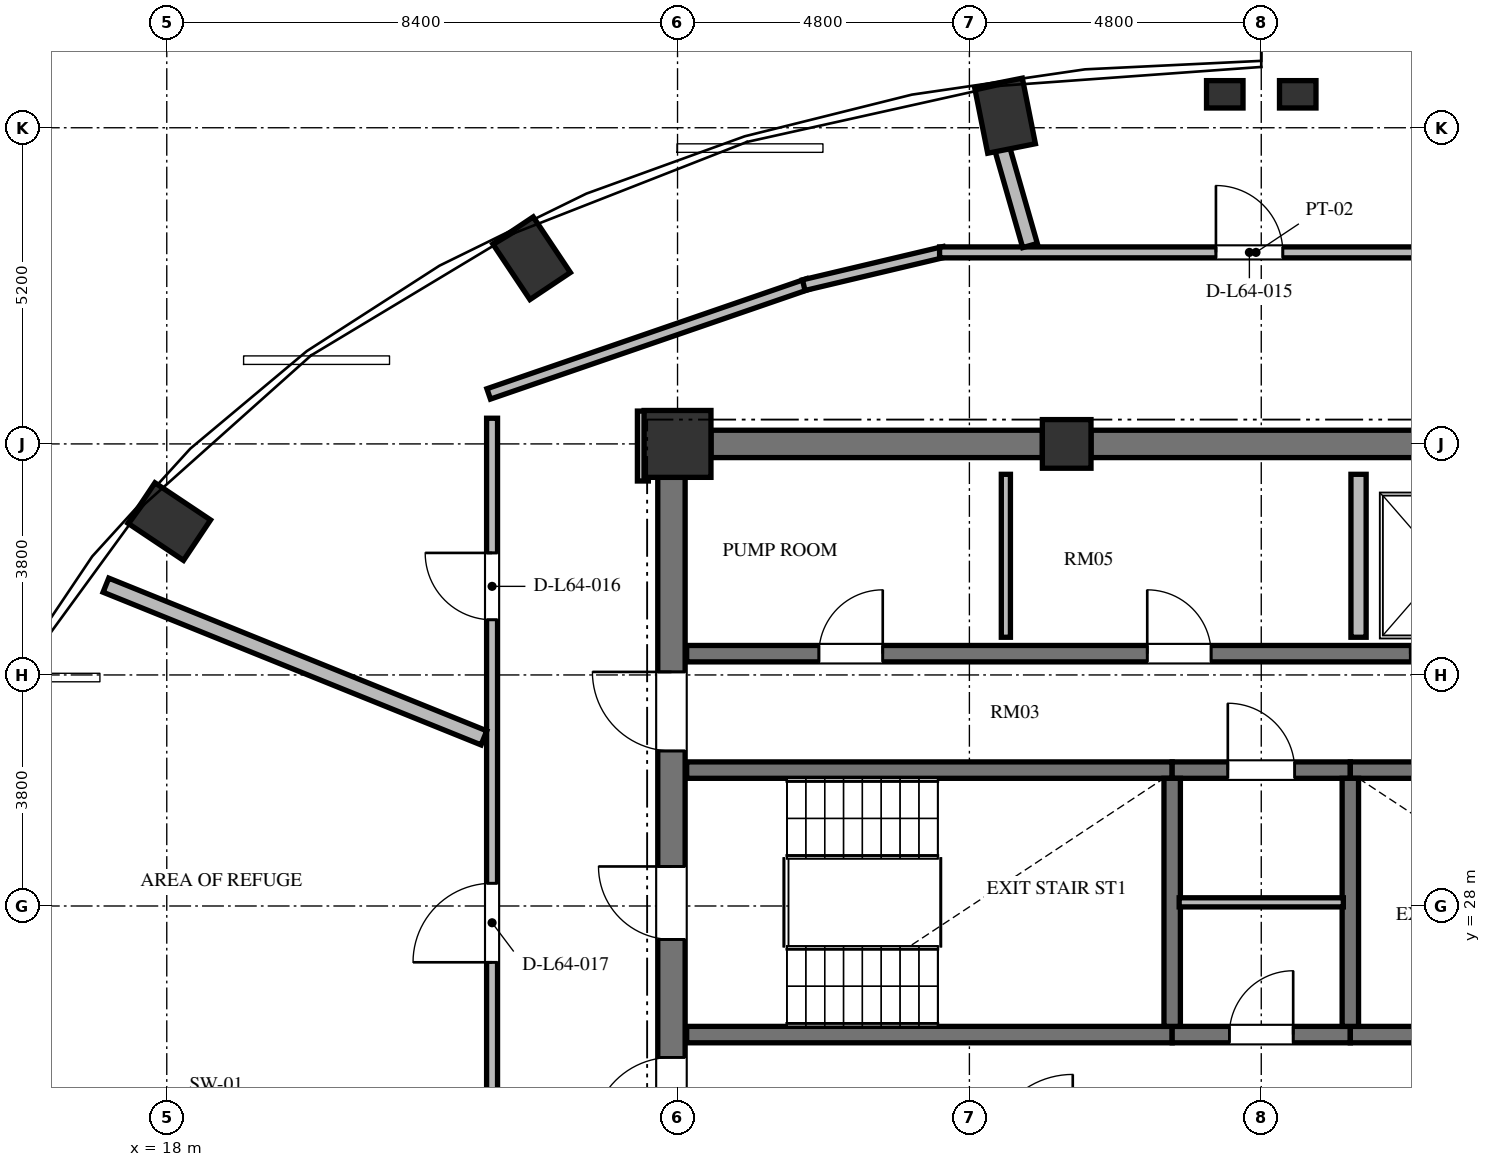
"""IFC4 building model, lengths in metres.
Left out: names, types, materials, properties, quantities, classifications, styles, units other than length and angle.
Written with IfcOpenShell. Run it as: python <this file> out.ifc"""

import sys

from ifc_helpers import new_model, si_unit, direction, frame, frame_2d, origin, origin_2d, place, context, subcontext, project, spatial, rectangle, extrude, element, fill, save


model = new_model("IFC4")
c1 = context("Model", 3, precision=1e-05, world=origin(), true_north=direction((0.0, 1.0)))
c2 = subcontext(c1, "Body", "Model", "MODEL_VIEW")
j1 = project(units=[si_unit("LENGTHUNIT", "METRE"), si_unit("PLANEANGLEUNIT", "RADIAN")], contexts=[c1])
p1 = place(None, origin())
s1 = spatial("IfcSite", under=j1, at=p1, CompositionType="ELEMENT")
p2 = place(p1, origin())
s2 = spatial("IfcBuilding", under=s1, at=p2, CompositionType="ELEMENT")
p3 = place(p2, frame((0.0, 0.0, 245.904)))
s3 = spatial("IfcBuildingStorey", under=s2, at=p3, CompositionType="ELEMENT", Elevation=245.904)
for number, where, z_axis, x_axis in (
    (1, (31.786, 40.998, 0.0), (0.0, 0.0, 1.0), (-0.195, 0.981, 0.0)),
    (2, (24.0, 38.654, 0.0), (0.0, 0.0, 1.0), (-0.556, 0.831, 0.0)),
    (3, (18.04, 34.323, 0.0), (0.0, 0.0, 1.0), (-0.831, 0.556, 0.0)),
):
    element("IfcColumn", number, at=place(p3, frame(where, z_axis=z_axis, x_axis=x_axis)), inside=s3, PredefinedType="COLUMN", context=c2, shape_type="SweptSolid", body=[
        extrude(rectangle(XDim=1.1, YDim=0.8, at=origin_2d()), origin(), (0.0, 0.0, 1.0), 5.472),
    ])
p4 = place(p3, frame((32.8, 35.6, 0.0), z_axis=(0.0, 0.0, 1.0), x_axis=(1.0, 0.0, 0.0)))
e4 = element("IfcColumn", 4, at=p4, inside=s3, PredefinedType="COLUMN", context=c2, shape_type="SweptSolid", body=[
    extrude(rectangle(XDim=0.8, YDim=0.8, at=origin_2d()), origin(), (0.0, 0.0, 1.0), 5.472),
])
p5 = place(p3, frame((26.4, 35.6, 0.0), z_axis=(0.0, 0.0, 1.0), x_axis=(1.0, 0.0, 0.0)))
e5 = element("IfcColumn", 5, at=p5, inside=s3, PredefinedType="COLUMN", context=c2, shape_type="SweptSolid", body=[
    extrude(rectangle(XDim=1.1, YDim=1.1, at=origin_2d()), origin(), (0.0, 0.0, 1.0), 5.472),
])
for number, where, z_axis, x_axis in (
    (6, (35.4, 41.35, 0.0), (0.0, 0.0, 1.0), (1.0, 0.0, 0.0)),
    (7, (36.6, 41.35, 0.0), (0.0, 0.0, 1.0), (1.0, 0.0, 0.0)),
):
    element("IfcColumn", number, at=place(p3, frame(where, z_axis=z_axis, x_axis=x_axis)), inside=s3, PredefinedType="PILASTER", context=c2, shape_type="SweptSolid", body=[
        extrude(rectangle(XDim=0.6, YDim=0.45, at=origin_2d()), origin(), (0.0, 0.0, 1.0), 5.472),
    ])
p6 = place(p3, frame((26.3, 20.95, 0.0), z_axis=(0.0, 0.0, 1.0), x_axis=(0.0, 1.0, 0.0)))
e8 = element("IfcWall", 8, at=p6, inside=s3, PredefinedType="SHEAR", context=c2, shape_type="SweptSolid", body=[
    extrude(rectangle(XDim=14.1, YDim=0.45, at=frame_2d((7.05, 0.0))), origin(), (0.0, 0.0, 1.0), 5.472),
])
p7 = place(p6, frame((6.5, 0.0, 0.0)))
e9 = element("IfcOpeningElement", 9, at=p7, cuts=e8, PredefinedType="OPENING", context=c2, shape_type="SweptSolid", body=[
    extrude(rectangle(XDim=1.2, YDim=2.15, at=frame_2d((0.6, 1.075))), frame((0.0, 0.235, 0.0), z_axis=(0.0, -1.0, 0.0), x_axis=(1.0, 0.0, 0.0)), (0.0, 0.0, 1.0), 0.47),
])
p8 = place(p6, frame((9.6, 0.0, 0.0)))
e10 = element("IfcOpeningElement", 10, at=p8, cuts=e8, PredefinedType="OPENING", context=c2, shape_type="SweptSolid", body=[
    extrude(rectangle(XDim=1.3, YDim=2.2, at=frame_2d((0.65, 1.1))), frame((0.0, 0.235, 0.0), z_axis=(0.0, -1.0, 0.0), x_axis=(1.0, 0.0, 0.0)), (0.0, 0.0, 1.0), 0.47),
])
p9 = place(p6, frame((3.26, 0.0, 0.0)))
e11 = element("IfcOpeningElement", 11, at=p9, cuts=e8, PredefinedType="OPENING", context=c2, shape_type="SweptSolid", body=[
    extrude(rectangle(XDim=1.3, YDim=2.2, at=frame_2d((0.65, 1.1))), frame((0.0, 0.235, 0.0), z_axis=(0.0, -1.0, 0.0), x_axis=(1.0, 0.0, 0.0)), (0.0, 0.0, 1.0), 0.47),
])
p10 = place(p3, frame((26.95, 35.6, 0.0), z_axis=(0.0, 0.0, 1.0), x_axis=(1.0, 0.0, 0.0)))
e12 = element("IfcWall", 12, at=p10, inside=s3, PredefinedType="SHEAR", context=c2, shape_type="SweptSolid", body=[
    extrude(rectangle(XDim=5.45, YDim=0.45, at=frame_2d((2.725, 0.0))), origin(), (0.0, 0.0, 1.0), 5.472),
])
p11 = place(p3, frame((33.2, 35.6, 0.0), z_axis=(0.0, 0.0, 1.0), x_axis=(1.0, 0.0, 0.0)))
e13 = element("IfcWall", 13, at=p11, inside=s3, PredefinedType="SHEAR", context=c2, shape_type="SweptSolid", body=[
    extrude(rectangle(XDim=5.6, YDim=0.45, at=frame_2d((2.8, 0.0))), origin(), (0.0, 0.0, 1.0), 5.472),
])
p12 = place(p3, frame((26.55, 30.235, 0.0), z_axis=(0.0, 0.0, 1.0), x_axis=(1.0, 0.0, 0.0)))
e14 = element("IfcWall", 14, at=p12, inside=s3, PredefinedType="SHEAR", context=c2, shape_type="SweptSolid", body=[
    extrude(rectangle(XDim=7.985, YDim=0.27, at=frame_2d((3.992, 0.0))), origin(), (0.0, 0.0, 1.0), 5.472),
])
p13 = place(p3, frame((34.535, 30.235, 0.0), z_axis=(0.0, 0.0, 1.0), x_axis=(1.0, 0.0, 0.0)))
e15 = element("IfcWall", 15, at=p13, inside=s3, PredefinedType="SHEAR", context=c2, shape_type="SweptSolid", body=[
    extrude(rectangle(XDim=2.93, YDim=0.27, at=frame_2d((1.465, 0.0))), origin(), (0.0, 0.0, 1.0), 5.472),
])
p14 = place(p13, frame((0.915, 0.0, 0.0)))
e16 = element("IfcOpeningElement", 16, at=p14, cuts=e15, PredefinedType="OPENING", context=c2, shape_type="SweptSolid", body=[
    extrude(rectangle(XDim=1.1, YDim=2.15, at=frame_2d((0.55, 1.075))), frame((0.0, 0.145, 0.0), z_axis=(0.0, -1.0, 0.0), x_axis=(1.0, 0.0, 0.0)), (0.0, 0.0, 1.0), 0.29),
])
p15 = place(p3, frame((37.465, 30.235, 0.0), z_axis=(0.0, 0.0, 1.0), x_axis=(1.0, 0.0, 0.0)))
e17 = element("IfcWall", 17, at=p15, inside=s3, PredefinedType="SHEAR", context=c2, shape_type="SweptSolid", body=[
    extrude(rectangle(XDim=7.985, YDim=0.27, at=frame_2d((3.992, 0.0))), origin(), (0.0, 0.0, 1.0), 5.472),
])
p16 = place(p15, frame((6.455, 0.0, 0.0)))
e18 = element("IfcOpeningElement", 18, at=p16, cuts=e17, PredefinedType="OPENING", context=c2, shape_type="SweptSolid", body=[
    extrude(rectangle(XDim=1.2, YDim=2.15, at=frame_2d((0.6, 1.075))), frame((0.0, 0.145, 0.0), z_axis=(0.0, -1.0, 0.0), x_axis=(1.0, 0.0, 0.0)), (0.0, 0.0, 1.0), 0.29),
])
p17 = place(p3, frame((26.55, 25.885, 0.0), z_axis=(0.0, 0.0, 1.0), x_axis=(1.0, 0.0, 0.0)))
e19 = element("IfcWall", 19, at=p17, inside=s3, PredefinedType="SHEAR", context=c2, shape_type="SweptSolid", body=[
    extrude(rectangle(XDim=7.985, YDim=0.27, at=frame_2d((3.992, 0.0))), origin(), (0.0, 0.0, 1.0), 5.472),
])
p18 = place(p3, frame((34.535, 25.885, 0.0), z_axis=(0.0, 0.0, 1.0), x_axis=(1.0, 0.0, 0.0)))
e20 = element("IfcWall", 20, at=p18, inside=s3, PredefinedType="SHEAR", context=c2, shape_type="SweptSolid", body=[
    extrude(rectangle(XDim=2.93, YDim=0.27, at=frame_2d((1.465, 0.0))), origin(), (0.0, 0.0, 1.0), 5.472),
])
p19 = place(p18, frame((0.94, 0.0, 0.0)))
e21 = element("IfcOpeningElement", 21, at=p19, cuts=e20, PredefinedType="OPENING", context=c2, shape_type="SweptSolid", body=[
    extrude(rectangle(XDim=1.05, YDim=2.15, at=frame_2d((0.525, 1.075))), frame((0.0, 0.145, 0.0), z_axis=(0.0, -1.0, 0.0), x_axis=(1.0, 0.0, 0.0)), (0.0, 0.0, 1.0), 0.29),
])
p20 = place(p3, frame((37.465, 25.885, 0.0), z_axis=(0.0, 0.0, 1.0), x_axis=(1.0, 0.0, 0.0)))
e22 = element("IfcWall", 22, at=p20, inside=s3, PredefinedType="SHEAR", context=c2, shape_type="SweptSolid", body=[
    extrude(rectangle(XDim=7.985, YDim=0.27, at=frame_2d((3.992, 0.0))), origin(), (0.0, 0.0, 1.0), 5.472),
])
for number, where, z_axis, x_axis in (
    (23, (34.535, 26.02, 0.0), (0.0, 0.0, 1.0), (0.0, 1.0, 0.0)),
    (24, (37.465, 26.02, 0.0), (0.0, 0.0, 1.0), (0.0, 1.0, 0.0)),
):
    element("IfcWall", number, at=place(p3, frame(where, z_axis=z_axis, x_axis=x_axis)), inside=s3, PredefinedType="SHEAR", context=c2, shape_type="SweptSolid", body=[
        extrude(rectangle(XDim=4.08, YDim=0.27, at=frame_2d((2.04, 0.0))), origin(), (0.0, 0.0, 1.0), 5.472),
    ])
p21 = place(p3, frame((34.65, 28.06, 0.0), z_axis=(0.0, 0.0, 1.0), x_axis=(1.0, 0.0, 0.0)))
e25 = element("IfcWall", 25, at=p21, inside=s3, PredefinedType="PARTITIONING", context=c2, shape_type="SweptSolid", body=[
    extrude(rectangle(XDim=2.7, YDim=0.15, at=frame_2d((1.35, 0.0))), origin(), (0.0, 0.0, 1.0), 5.272),
])
p22 = place(p3, frame((26.55, 32.15, 0.0), z_axis=(0.0, 0.0, 1.0), x_axis=(1.0, 0.0, 0.0)))
e26 = element("IfcWall", 26, at=p22, inside=s3, PredefinedType="SHEAR", context=c2, shape_type="SweptSolid", body=[
    extrude(rectangle(XDim=16.4, YDim=0.27, at=frame_2d((8.2, 0.0))), origin(), (0.0, 0.0, 1.0), 5.472),
])
p23 = place(p22, frame((2.175, 0.0, 0.0)))
e27 = element("IfcOpeningElement", 27, at=p23, cuts=e26, PredefinedType="OPENING", context=c2, shape_type="SweptSolid", body=[
    extrude(rectangle(XDim=1.05, YDim=2.15, at=frame_2d((0.525, 1.075))), frame((0.0, 0.145, 0.0), z_axis=(0.0, -1.0, 0.0), x_axis=(1.0, 0.0, 0.0)), (0.0, 0.0, 1.0), 0.29),
])
p24 = place(p22, frame((7.575, 0.0, 0.0)))
e28 = element("IfcOpeningElement", 28, at=p24, cuts=e26, PredefinedType="OPENING", context=c2, shape_type="SweptSolid", body=[
    extrude(rectangle(XDim=1.05, YDim=2.15, at=frame_2d((0.525, 1.075))), frame((0.0, 0.145, 0.0), z_axis=(0.0, -1.0, 0.0), x_axis=(1.0, 0.0, 0.0)), (0.0, 0.0, 1.0), 0.29),
])
p25 = place(p22, frame((11.9, 0.0, 0.0)))
e29 = element("IfcOpeningElement", 29, at=p25, cuts=e26, PredefinedType="OPENING", context=c2, shape_type="SweptSolid", body=[
    extrude(rectangle(XDim=1.1, YDim=2.2, at=frame_2d((0.55, 1.1))), frame((0.0, 0.145, 0.0), z_axis=(0.0, -1.0, 0.0), x_axis=(1.0, 0.0, 0.0)), (0.0, 0.0, 1.0), 0.29),
])
p26 = place(p22, frame((14.5, 0.0, 0.0)))
e30 = element("IfcOpeningElement", 30, at=p26, cuts=e26, PredefinedType="OPENING", context=c2, shape_type="SweptSolid", body=[
    extrude(rectangle(XDim=1.1, YDim=2.2, at=frame_2d((0.55, 1.1))), frame((0.0, 0.145, 0.0), z_axis=(0.0, -1.0, 0.0), x_axis=(1.0, 0.0, 0.0)), (0.0, 0.0, 1.0), 0.29),
])
p27 = place(p3, frame((37.6, 32.42, 0.0), z_axis=(0.0, 0.0, 1.0), x_axis=(0.0, 1.0, 0.0)))
e31 = element("IfcWall", 31, at=p27, inside=s3, PredefinedType="SOLIDWALL", context=c2, shape_type="SweptSolid", body=[
    extrude(rectangle(XDim=2.68, YDim=0.25, at=frame_2d((1.34, 0.0))), origin(), (0.0, 0.0, 1.0), 5.272),
])
p28 = place(p3, frame((31.8, 32.42, 0.0), z_axis=(0.0, 0.0, 1.0), x_axis=(0.0, 1.0, 0.0)))
e32 = element("IfcWall", 32, at=p28, inside=s3, PredefinedType="PARTITIONING", context=c2, shape_type="SweptSolid", body=[
    extrude(rectangle(XDim=2.68, YDim=0.15, at=frame_2d((1.34, 0.0))), origin(), (0.0, 0.0, 1.0), 5.272),
])
p29 = place(p3, frame((23.294, 36.422, 0.0), z_axis=(0.0, 0.0, 1.0), x_axis=(0.945493277461, 0.325641616316, 0.0)))
e33 = element("IfcWall", 33, at=p29, inside=s3, PredefinedType="PARTITIONING", context=c2, shape_type="SweptSolid", body=[
    extrude(rectangle(XDim=5.562, YDim=0.18, at=frame_2d((2.781, 0.0))), origin(), (0.0, 0.0, 1.0), 4.897),
])
p30 = place(p3, frame((28.476, 38.211, 0.0), z_axis=(0.0, 0.0, 1.0), x_axis=(0.973030562203, 0.230676234189, 0.0)))
e34 = element("IfcWall", 34, at=p30, inside=s3, PredefinedType="PARTITIONING", context=c2, shape_type="SweptSolid", body=[
    extrude(rectangle(XDim=2.377, YDim=0.18, at=frame_2d((1.188, 0.0))), origin(), (0.0, 0.0, 1.0), 5.272),
])
p31 = place(p3, frame((30.71, 38.75, 0.0), z_axis=(0.0, 0.0, 1.0), x_axis=(1.0, 0.0, 0.0)))
e35 = element("IfcWall", 35, at=p31, inside=s3, PredefinedType="PARTITIONING", context=c2, shape_type="SweptSolid", body=[
    extrude(rectangle(XDim=20.815, YDim=0.18, at=frame_2d((10.408, 0.0))), origin(), (0.0, 0.0, 1.0), 4.897),
])
p32 = place(p31, frame((16.846, 0.0, 0.0)))
e36 = element("IfcOpeningElement", 36, at=p32, cuts=e35, PredefinedType="OPENING", context=c2, shape_type="SweptSolid", body=[
    extrude(rectangle(XDim=0.95, YDim=2.1, at=frame_2d((0.475, 1.05))), frame((0.0, 0.1, 0.0), z_axis=(0.0, -1.0, 0.0), x_axis=(1.0, 0.0, 0.0)), (0.0, 0.0, 1.0), 0.2),
])
p33 = place(p31, frame((10.715, 0.0, 0.0)))
e37 = element("IfcOpeningElement", 37, at=p33, cuts=e35, PredefinedType="OPENING", context=c2, shape_type="SweptSolid", body=[
    extrude(rectangle(XDim=1.3, YDim=2.2, at=frame_2d((0.65, 1.1))), frame((0.0, 0.1, 0.0), z_axis=(0.0, -1.0, 0.0), x_axis=(1.0, 0.0, 0.0)), (0.0, 0.0, 1.0), 0.2),
])
p34 = place(p31, frame((4.545, 0.0, 0.0)))
e38 = element("IfcOpeningElement", 38, at=p34, cuts=e35, PredefinedType="OPENING", context=c2, shape_type="SweptSolid", body=[
    extrude(rectangle(XDim=1.1, YDim=2.15, at=frame_2d((0.55, 1.075))), frame((0.0, 0.1, 0.0), z_axis=(0.0, -1.0, 0.0), x_axis=(1.0, 0.0, 0.0)), (0.0, 0.0, 1.0), 0.2),
])
p35 = place(p3, frame((25.83, 36.14, 0.0), z_axis=(0.0, 0.0, 1.0), x_axis=(0.0, -1.0, 0.0)))
e39 = element("IfcWall", 39, at=p35, inside=s3, PredefinedType="PARTITIONING", context=c2, shape_type="SweptSolid", body=[
    extrude(rectangle(XDim=1.15, YDim=0.18, at=frame_2d((0.575, 0.0))), origin(), (0.0, 0.0, 1.0), 5.272),
])
p36 = place(p3, frame((23.35, 19.98, 0.0), z_axis=(0.0, 0.0, 1.0), x_axis=(0.0, 1.0, 0.0)))
e40 = element("IfcWall", 40, at=p36, inside=s3, PredefinedType="PARTITIONING", context=c2, shape_type="SweptSolid", body=[
    extrude(rectangle(XDim=16.042, YDim=0.18, at=frame_2d((8.021, 0.0))), origin(), (0.0, 0.0, 1.0), 5.272),
])
p37 = place(p36, frame((1.848, 0.0, 0.0)))
e41 = element("IfcOpeningElement", 41, at=p37, cuts=e40, PredefinedType="OPENING", context=c2, shape_type="SweptSolid", body=[
    extrude(rectangle(XDim=1.3, YDim=2.2, at=frame_2d((0.65, 1.1))), frame((0.0, 0.1, 0.0), z_axis=(0.0, -1.0, 0.0), x_axis=(1.0, 0.0, 0.0)), (0.0, 0.0, 1.0), 0.2),
])
p38 = place(p36, frame((12.727, 0.0, 0.0)))
e42 = element("IfcOpeningElement", 42, at=p38, cuts=e40, PredefinedType="OPENING", context=c2, shape_type="SweptSolid", body=[
    extrude(rectangle(XDim=1.1, YDim=2.15, at=frame_2d((0.55, 1.075))), frame((0.0, 0.1, 0.0), z_axis=(0.0, -1.0, 0.0), x_axis=(1.0, 0.0, 0.0)), (0.0, 0.0, 1.0), 0.2),
])
p39 = place(p36, frame((7.094, 0.0, 0.0)))
e43 = element("IfcOpeningElement", 43, at=p39, cuts=e40, PredefinedType="OPENING", context=c2, shape_type="SweptSolid", body=[
    extrude(rectangle(XDim=1.3, YDim=2.2, at=frame_2d((0.65, 1.1))), frame((0.0, 0.1, 0.0), z_axis=(0.0, -1.0, 0.0), x_axis=(1.0, 0.0, 0.0)), (0.0, 0.0, 1.0), 0.2),
])
p40 = place(p3, frame((32.197, 38.863, 0.0), z_axis=(0.0, 0.0, 1.0), x_axis=(-0.2757058954, 0.961242039885, 0.0)))
e44 = element("IfcWall", 44, at=p40, inside=s3, PredefinedType="SOLIDWALL", context=c2, shape_type="SweptSolid", body=[
    extrude(rectangle(XDim=2.324, YDim=0.25, at=frame_2d((1.162, 0.0))), origin(), (0.0, 0.0, 1.0), 4.757),
])
p41 = place(p3, frame((23.216, 30.765, 0.0), z_axis=(0.0, 0.0, 1.0), x_axis=(-0.927177883422, 0.374621372179, 0.0)))
e45 = element("IfcWall", 45, at=p41, inside=s3, PredefinedType="SOLIDWALL", context=c2, shape_type="SweptSolid", body=[
    extrude(rectangle(XDim=6.705, YDim=0.25, at=frame_2d((3.353, 0.0))), origin(), (0.0, 0.0, 1.0), 5.272),
])
p42 = place(p7, origin())
e46 = element("IfcDoor", 46, at=p42, inside=s3, OperationType="SINGLE_SWING_RIGHT", PredefinedType="DOOR", context=c2, shape_type="SweptSolid", body=[
    extrude(rectangle(XDim=1.2, YDim=2.15, at=frame_2d((0.6, 1.075))), frame((0.0, 0.025, 0.0), z_axis=(0.0, -1.0, 0.0), x_axis=(1.0, 0.0, 0.0)), (0.0, 0.0, 1.0), 0.05),
])
fill(e9, e46)
p43 = place(p19, origin())
e47 = element("IfcDoor", 47, at=p43, inside=s3, OperationType="SINGLE_SWING_RIGHT", PredefinedType="DOOR", context=c2, shape_type="SweptSolid", body=[
    extrude(rectangle(XDim=1.05, YDim=2.15, at=frame_2d((0.525, 1.075))), frame((0.0, 0.025, 0.0), z_axis=(0.0, -1.0, 0.0), x_axis=(1.0, 0.0, 0.0)), (0.0, 0.0, 1.0), 0.05),
])
fill(e21, e47)
p44 = place(p14, origin())
e48 = element("IfcDoor", 48, at=p44, inside=s3, OperationType="SINGLE_SWING_LEFT", PredefinedType="DOOR", context=c2, shape_type="SweptSolid", body=[
    extrude(rectangle(XDim=1.1, YDim=2.15, at=frame_2d((0.55, 1.075))), frame((0.0, 0.025, 0.0), z_axis=(0.0, -1.0, 0.0), x_axis=(1.0, 0.0, 0.0)), (0.0, 0.0, 1.0), 0.05),
])
fill(e16, e48)
p45 = place(p8, origin())
e49 = element("IfcDoor", 49, at=p45, inside=s3, OperationType="SINGLE_SWING_RIGHT", PredefinedType="DOOR", context=c2, shape_type="SweptSolid", body=[
    extrude(rectangle(XDim=1.3, YDim=2.2, at=frame_2d((0.65, 1.1))), frame((0.0, 0.025, 0.0), z_axis=(0.0, -1.0, 0.0), x_axis=(1.0, 0.0, 0.0)), (0.0, 0.0, 1.0), 0.05),
])
fill(e10, e49)
p46 = place(p9, origin())
e50 = element("IfcDoor", 50, at=p46, inside=s3, OperationType="SINGLE_SWING_LEFT", PredefinedType="DOOR", context=c2, shape_type="SweptSolid", body=[
    extrude(rectangle(XDim=1.3, YDim=2.2, at=frame_2d((0.65, 1.1))), frame((0.0, 0.025, 0.0), z_axis=(0.0, -1.0, 0.0), x_axis=(1.0, 0.0, 0.0)), (0.0, 0.0, 1.0), 0.05),
])
fill(e11, e50)
p47 = place(p23, origin())
e51 = element("IfcDoor", 51, at=p47, inside=s3, OperationType="SINGLE_SWING_RIGHT", PredefinedType="DOOR", context=c2, shape_type="SweptSolid", body=[
    extrude(rectangle(XDim=1.05, YDim=2.15, at=frame_2d((0.525, 1.075))), frame((0.0, 0.025, 0.0), z_axis=(0.0, -1.0, 0.0), x_axis=(1.0, 0.0, 0.0)), (0.0, 0.0, 1.0), 0.05),
])
fill(e27, e51)
p48 = place(p24, origin())
e52 = element("IfcDoor", 52, at=p48, inside=s3, OperationType="SINGLE_SWING_LEFT", PredefinedType="DOOR", context=c2, shape_type="SweptSolid", body=[
    extrude(rectangle(XDim=1.05, YDim=2.15, at=frame_2d((0.525, 1.075))), frame((0.0, 0.025, 0.0), z_axis=(0.0, -1.0, 0.0), x_axis=(1.0, 0.0, 0.0)), (0.0, 0.0, 1.0), 0.05),
])
fill(e28, e52)
p49 = place(p25, origin())
e53 = element("IfcDoor", 53, at=p49, inside=s3, OperationType="SLIDING_TO_LEFT", PredefinedType="DOOR", context=c2, shape_type="SweptSolid", body=[
    extrude(rectangle(XDim=1.1, YDim=2.2, at=frame_2d((0.55, 1.1))), frame((0.0, 0.025, 0.0), z_axis=(0.0, -1.0, 0.0), x_axis=(1.0, 0.0, 0.0)), (0.0, 0.0, 1.0), 0.05),
])
fill(e29, e53)
p50 = place(p34, origin())
e54 = element("IfcDoor", 54, at=p50, inside=s3, OperationType="SINGLE_SWING_LEFT", PredefinedType="DOOR", context=c2, shape_type="SweptSolid", body=[
    extrude(rectangle(XDim=1.1, YDim=2.15, at=frame_2d((0.55, 1.075))), frame((0.0, 0.025, 0.0), z_axis=(0.0, -1.0, 0.0), x_axis=(1.0, 0.0, 0.0)), (0.0, 0.0, 1.0), 0.05),
])
fill(e38, e54)
p51 = place(p38, origin())
e55 = element("IfcDoor", 55, at=p51, inside=s3, OperationType="SINGLE_SWING_RIGHT", PredefinedType="DOOR", context=c2, shape_type="SweptSolid", body=[
    extrude(rectangle(XDim=1.1, YDim=2.15, at=frame_2d((0.55, 1.075))), frame((0.0, 0.025, 0.0), z_axis=(0.0, -1.0, 0.0), x_axis=(1.0, 0.0, 0.0)), (0.0, 0.0, 1.0), 0.05),
])
fill(e42, e55)
p52 = place(p39, origin())
e56 = element("IfcDoor", 56, at=p52, inside=s3, OperationType="SINGLE_SWING_LEFT", PredefinedType="DOOR", context=c2, shape_type="SweptSolid", body=[
    extrude(rectangle(XDim=1.3, YDim=2.2, at=frame_2d((0.65, 1.1))), frame((0.0, 0.025, 0.0), z_axis=(0.0, -1.0, 0.0), x_axis=(1.0, 0.0, 0.0)), (0.0, 0.0, 1.0), 0.05),
])
fill(e43, e56)
save(model, sys.argv[1])
